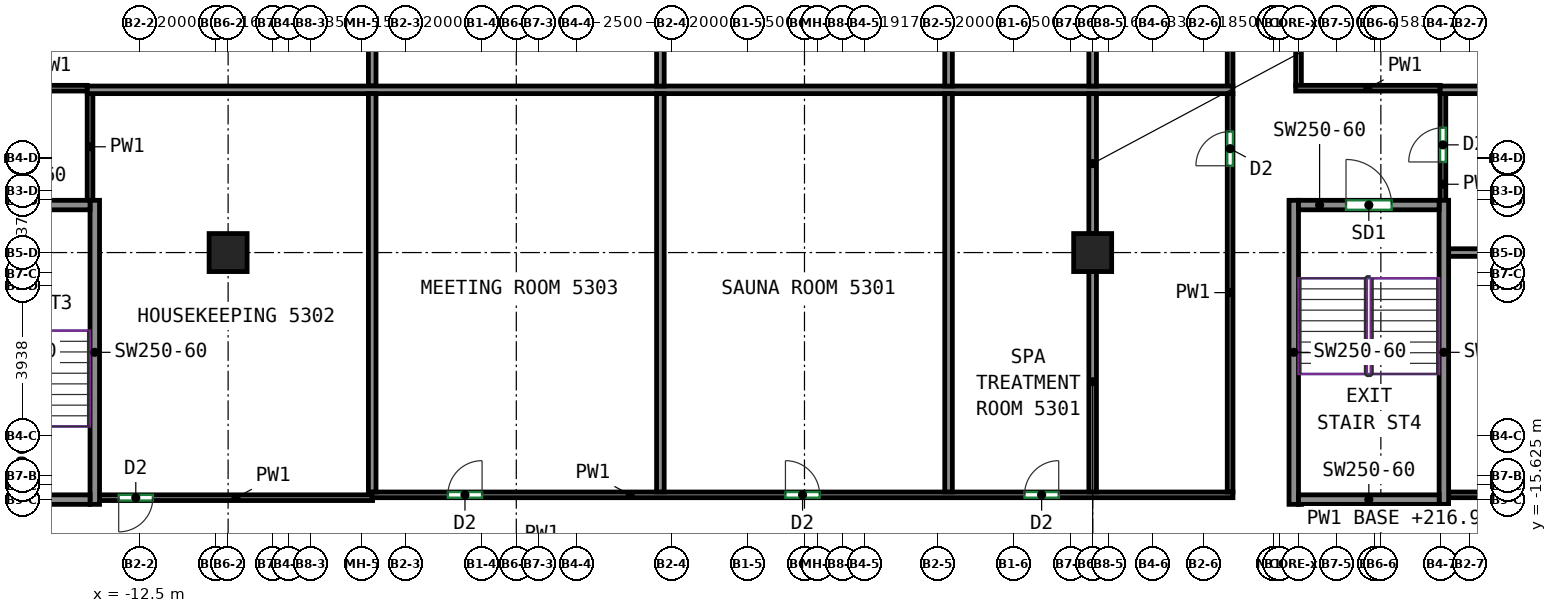
"""IFC4 building model, lengths in metres.
Left out: names, types, materials, properties, quantities, classifications, styles, units other than length and angle.
Written with IfcOpenShell. Run it as: python <this file> out.ifc"""

import sys

from ifc_helpers import new_model, si_unit, direction, frame, frame_2d, origin, origin_2d, place, context, subcontext, project, spatial, rectangle, extrude, source, transform, mapped, element, fill, save


model = new_model("IFC4")
c1 = context("Model", 3, precision=1e-05, world=origin(), true_north=direction((0.0, 1.0)))
c2 = subcontext(c1, "Body", "Model", "MODEL_VIEW")
j1 = project(units=[si_unit("LENGTHUNIT", "METRE"), si_unit("PLANEANGLEUNIT", "RADIAN")], contexts=[c1])
p1 = place(None, origin())
s1 = spatial("IfcSite", under=j1, at=p1, CompositionType="ELEMENT")
p2 = place(p1, origin())
s2 = spatial("IfcBuilding", under=s1, at=p2, CompositionType="ELEMENT")
p3 = place(p2, frame((0.0, 0.0, 216.9)))
s3 = spatial("IfcBuildingStorey", under=s2, at=p3, CompositionType="ELEMENT", Elevation=216.9)
m1 = source(origin(), c2, "Body", "SweptSolid", [
    extrude(rectangle(XDim=1.0, YDim=1.0, at=origin_2d()), origin(), (0.0, 0.0, 1.0), 3.12),
])
for number, where, z_axis, x_axis in (
    (1, (-10.167, -9.125, 0.0), (0.0, 0.0, 1.0), (1.0, 0.0, 0.0)),
    (2, (12.583, -9.125, 0.0), (0.0, 0.0, 1.0), (1.0, 0.0, 0.0)),
):
    element("IfcColumn", number, at=place(p3, frame(where, z_axis=z_axis, x_axis=x_axis)), inside=s3, PredefinedType="COLUMN", context=c2, shape_type="MappedRepresentation", body=[
        mapped(m1, transform((0.0, 0.0, 0.0))),
    ])
m2 = source(origin(), c2, "Body", "SweptSolid", [
    extrude(rectangle(XDim=8.0, YDim=0.25, at=frame_2d((4.0, 0.0))), origin(), (0.0, 0.0, 1.0), 3.12),
])
p4 = place(p3, frame((-13.675, -15.75, 0.0), z_axis=(0.0, 0.0, 1.0), x_axis=(0.0, 1.0, 0.0)))
e3 = element("IfcWall", 3, at=p4, inside=s3, PredefinedType="SHEAR", context=c2, shape_type="MappedRepresentation", body=[
    mapped(m2, transform((0.0, 0.0, 0.0))),
])
m3 = source(origin(), c2, "Body", "SweptSolid", [
    extrude(rectangle(XDim=3.7, YDim=0.25, at=frame_2d((1.85, 0.0))), origin(), (0.0, 0.0, 1.0), 3.12),
])
p5 = place(p3, frame((-17.5, -15.625, 0.0), z_axis=(0.0, 0.0, 1.0), x_axis=(1.0, 0.0, 0.0)))
e4 = element("IfcWall", 4, at=p5, inside=s3, PredefinedType="SHEAR", context=c2, shape_type="MappedRepresentation", body=[
    mapped(m3, transform((0.0, 0.0, 0.0))),
])
p6 = place(p5, frame((1.25, 0.0, 0.0)))
e5 = element("IfcOpeningElement", 5, at=p6, cuts=e4, PredefinedType="OPENING", context=c2, shape_type="SweptSolid", body=[
    extrude(rectangle(XDim=1.2, YDim=2.1, at=frame_2d((0.6, 1.05))), frame((0.0, 0.135, 0.0), z_axis=(0.0, -1.0, 0.0), x_axis=(1.0, 0.0, 0.0)), (0.0, 0.0, 1.0), 0.27),
])
p7 = place(p3, frame((-17.5, -7.875, 0.0), z_axis=(0.0, 0.0, 1.0), x_axis=(1.0, 0.0, 0.0)))
e6 = element("IfcWall", 6, at=p7, inside=s3, PredefinedType="SHEAR", context=c2, shape_type="MappedRepresentation", body=[
    mapped(m3, transform((0.0, 0.0, 0.0))),
])
for number, where, z_axis, x_axis in (
    (7, (17.875, -15.75, 0.0), (0.0, 0.0, 1.0), (0.0, 1.0, 0.0)),
    (8, (21.825, -15.75, 0.0), (0.0, 0.0, 1.0), (0.0, 1.0, 0.0)),
):
    element("IfcWall", number, at=place(p3, frame(where, z_axis=z_axis, x_axis=x_axis)), inside=s3, PredefinedType="SHEAR", context=c2, shape_type="MappedRepresentation", body=[
        mapped(m2, transform((0.0, 0.0, 0.0))),
    ])
p8 = place(p3, frame((18.0, -15.625, 0.0), z_axis=(0.0, 0.0, 1.0), x_axis=(1.0, 0.0, 0.0)))
e9 = element("IfcWall", 9, at=p8, inside=s3, PredefinedType="SHEAR", context=c2, shape_type="MappedRepresentation", body=[
    mapped(m3, transform((0.0, 0.0, 0.0))),
])
p9 = place(p3, frame((18.0, -7.875, 0.0), z_axis=(0.0, 0.0, 1.0), x_axis=(1.0, 0.0, 0.0)))
e10 = element("IfcWall", 10, at=p9, inside=s3, PredefinedType="SHEAR", context=c2, shape_type="MappedRepresentation", body=[
    mapped(m3, transform((0.0, 0.0, 0.0))),
])
p10 = place(p9, frame((1.25, 0.0, 0.0)))
e11 = element("IfcOpeningElement", 11, at=p10, cuts=e10, PredefinedType="OPENING", context=c2, shape_type="SweptSolid", body=[
    extrude(rectangle(XDim=1.2, YDim=2.1, at=frame_2d((0.6, 1.05))), frame((0.0, 0.135, 0.0), z_axis=(0.0, -1.0, 0.0), x_axis=(1.0, 0.0, 0.0)), (0.0, 0.0, 1.0), 0.27),
])
p11 = place(p3, frame((18.0, -4.725, 0.0), z_axis=(0.0, 0.0, 1.0), x_axis=(0.0, 1.0, 0.0)))
e12 = element("IfcWall", 12, at=p11, inside=s3, PredefinedType="PARTITIONING", context=c2, shape_type="SweptSolid", body=[
    extrude(rectangle(XDim=8.35, YDim=0.15, at=frame_2d((4.175, 0.0))), origin(), (0.0, 0.0, 1.0), 3.12),
])
p12 = place(p11, frame((2.919, 0.0, 0.0)))
e13 = element("IfcOpeningElement", 13, at=p12, cuts=e12, PredefinedType="OPENING", context=c2, shape_type="SweptSolid", body=[
    extrude(rectangle(XDim=0.9, YDim=2.1, at=frame_2d((0.45, 1.05))), frame((0.0, 0.085, 0.0), z_axis=(0.0, -1.0, 0.0), x_axis=(1.0, 0.0, 0.0)), (0.0, 0.0, 1.0), 0.17),
])
p13 = place(p3, frame((17.925, -4.8, 0.0), z_axis=(0.0, 0.0, 1.0), x_axis=(1.0, 0.0, 0.0)))
e14 = element("IfcWall", 14, at=p13, inside=s3, PredefinedType="PARTITIONING", context=c2, shape_type="SweptSolid", body=[
    extrude(rectangle(XDim=3.802, YDim=0.15, at=frame_2d((1.901, 0.0))), origin(), (0.0, 0.0, 1.0), 3.12),
])
p14 = place(p3, frame((21.8, -7.75, 0.0), z_axis=(0.0, 0.0, 1.0), x_axis=(0.0, 1.0, 0.0)))
e15 = element("IfcWall", 15, at=p14, inside=s3, PredefinedType="PARTITIONING", context=c2, shape_type="SweptSolid", body=[
    extrude(rectangle(XDim=2.817, YDim=0.15, at=frame_2d((1.408, 0.0))), origin(), (0.0, 0.0, 1.0), 3.12),
])
p15 = place(p14, frame((1.009, 0.0, 0.0)))
e16 = element("IfcOpeningElement", 16, at=p15, cuts=e15, PredefinedType="OPENING", context=c2, shape_type="SweptSolid", body=[
    extrude(rectangle(XDim=0.9, YDim=2.1, at=frame_2d((0.45, 1.05))), frame((0.0, 0.085, 0.0), z_axis=(0.0, -1.0, 0.0), x_axis=(1.0, 0.0, 0.0)), (0.0, 0.0, 1.0), 0.17),
])
p16 = place(p3, frame((21.95, -15.5, 0.0), z_axis=(0.0, 0.0, 1.0), x_axis=(1.0, 0.0, 0.0)))
e17 = element("IfcWall", 17, at=p16, inside=s3, PredefinedType="PARTITIONING", context=c2, shape_type="SweptSolid", body=[
    extrude(rectangle(XDim=5.875, YDim=0.15, at=frame_2d((2.938, 0.0))), origin(), (0.0, 0.0, 1.0), 3.12),
])
p17 = place(p16, frame((3.658, 0.0, 0.0)))
e18 = element("IfcOpeningElement", 18, at=p17, cuts=e17, PredefinedType="OPENING", context=c2, shape_type="SweptSolid", body=[
    extrude(rectangle(XDim=1.0, YDim=2.1, at=frame_2d((0.5, 1.05))), frame((0.0, 0.085, 0.0), z_axis=(0.0, -1.0, 0.0), x_axis=(1.0, 0.0, 0.0)), (0.0, 0.0, 1.0), 0.17),
])
p18 = place(p3, frame((-17.575, -4.8, 0.0), z_axis=(0.0, 0.0, 1.0), x_axis=(1.0, 0.0, 0.0)))
e19 = element("IfcWall", 19, at=p18, inside=s3, PredefinedType="PARTITIONING", context=c2, shape_type="SweptSolid", body=[
    extrude(rectangle(XDim=3.702, YDim=0.15, at=frame_2d((1.851, 0.0))), origin(), (0.0, 0.0, 1.0), 3.12),
])
p19 = place(p3, frame((16.2, -4.753, 0.0), z_axis=(0.0, 0.0, 1.0), x_axis=(0.0, 1.0, 0.0)))
e20 = element("IfcWall", 20, at=p19, inside=s3, PredefinedType="PARTITIONING", context=c2, shape_type="SweptSolid", body=[
    extrude(rectangle(XDim=8.378, YDim=0.15, at=frame_2d((4.189, 0.0))), origin(), (0.0, 0.0, 1.0), 3.12),
])
p20 = place(p19, frame((1.514, 0.0, 0.0)))
e21 = element("IfcOpeningElement", 21, at=p20, cuts=e20, PredefinedType="OPENING", context=c2, shape_type="SweptSolid", body=[
    extrude(rectangle(XDim=0.9, YDim=2.1, at=frame_2d((0.45, 1.05))), frame((0.0, 0.085, 0.0), z_axis=(0.0, -1.0, 0.0), x_axis=(1.0, 0.0, 0.0)), (0.0, 0.0, 1.0), 0.17),
])
p21 = place(p3, frame((-13.8, -7.75, 0.0), z_axis=(0.0, 0.0, 1.0), x_axis=(0.0, 1.0, 0.0)))
e22 = element("IfcWall", 22, at=p21, inside=s3, PredefinedType="PARTITIONING", context=c2, shape_type="SweptSolid", body=[
    extrude(rectangle(XDim=2.817, YDim=0.15, at=frame_2d((1.408, 0.0))), origin(), (0.0, 0.0, 1.0), 3.12),
])
p22 = place(p3, frame((-6.365, -15.575, 0.0), z_axis=(0.0, 0.0, 1.0), x_axis=(-1.0, 0.0, 0.0)))
e23 = element("IfcWall", 23, at=p22, inside=s3, PredefinedType="PARTITIONING", context=c2, shape_type="SweptSolid", body=[
    extrude(rectangle(XDim=7.185, YDim=0.15, at=frame_2d((3.593, 0.0))), origin(), (0.0, 0.0, 1.0), 3.12),
])
p23 = place(p22, frame((5.781, 0.0, 0.0)))
e24 = element("IfcOpeningElement", 24, at=p23, cuts=e23, PredefinedType="OPENING", context=c2, shape_type="SweptSolid", body=[
    extrude(rectangle(XDim=0.9, YDim=2.1, at=frame_2d((0.45, 1.05))), frame((0.0, 0.085, 0.0), z_axis=(0.0, -1.0, 0.0), x_axis=(1.0, 0.0, 0.0)), (0.0, 0.0, 1.0), 0.17),
])
p24 = place(p3, frame((-6.385, -15.5, 0.0), z_axis=(0.0, 0.0, 1.0), x_axis=(1.0, 0.0, 0.0)))
e25 = element("IfcWall", 25, at=p24, inside=s3, PredefinedType="PARTITIONING", context=c2, shape_type="SweptSolid", body=[
    extrude(rectangle(XDim=22.66, YDim=0.15, at=frame_2d((11.33, 0.0))), origin(), (0.0, 0.0, 1.0), 3.12),
])
p25 = place(p24, frame((2.001, 0.0, 0.0)))
e26 = element("IfcOpeningElement", 26, at=p25, cuts=e25, PredefinedType="OPENING", context=c2, shape_type="SweptSolid", body=[
    extrude(rectangle(XDim=0.9, YDim=2.1, at=frame_2d((0.45, 1.05))), frame((0.0, 0.085, 0.0), z_axis=(0.0, -1.0, 0.0), x_axis=(1.0, 0.0, 0.0)), (0.0, 0.0, 1.0), 0.17),
])
p26 = place(p24, frame((10.884, 0.0, 0.0)))
e27 = element("IfcOpeningElement", 27, at=p26, cuts=e25, PredefinedType="OPENING", context=c2, shape_type="SweptSolid", body=[
    extrude(rectangle(XDim=0.9, YDim=2.1, at=frame_2d((0.45, 1.05))), frame((0.0, 0.085, 0.0), z_axis=(0.0, -1.0, 0.0), x_axis=(1.0, 0.0, 0.0)), (0.0, 0.0, 1.0), 0.17),
])
p27 = place(p24, frame((17.175, 0.0, 0.0)))
e28 = element("IfcOpeningElement", 28, at=p27, cuts=e25, PredefinedType="OPENING", context=c2, shape_type="SweptSolid", body=[
    extrude(rectangle(XDim=0.9, YDim=2.1, at=frame_2d((0.45, 1.05))), frame((0.0, 0.085, 0.0), z_axis=(0.0, -1.0, 0.0), x_axis=(1.0, 0.0, 0.0)), (0.0, 0.0, 1.0), 0.17),
])
p28 = place(p3, frame((16.2, -15.425, 0.0), z_axis=(0.0, 0.0, 1.0), x_axis=(0.0, 1.0, 0.0)))
e29 = element("IfcWall", 29, at=p28, inside=s3, PredefinedType="PARTITIONING", context=c2, shape_type="SweptSolid", body=[
    extrude(rectangle(XDim=10.492, YDim=0.15, at=frame_2d((5.246, 0.0))), origin(), (0.0, 0.0, 1.0), 3.12),
])
p29 = place(p28, frame((8.584, 0.0, 0.0)))
e30 = element("IfcOpeningElement", 30, at=p29, cuts=e29, PredefinedType="OPENING", context=c2, shape_type="SweptSolid", body=[
    extrude(rectangle(XDim=0.9, YDim=2.1, at=frame_2d((0.45, 1.05))), frame((0.0, 0.085, 0.0), z_axis=(0.0, -1.0, 0.0), x_axis=(1.0, 0.0, 0.0)), (0.0, 0.0, 1.0), 0.17),
])
p30 = place(p3, frame((21.727, -4.843, 0.0), z_axis=(0.0, 0.0, 1.0), x_axis=(1.0, 0.0, 0.0)))
e31 = element("IfcWall", 31, at=p30, inside=s3, PredefinedType="PARTITIONING", context=c2, shape_type="SweptSolid", body=[
    extrude(rectangle(XDim=9.273, YDim=0.2, at=frame_2d((4.636, 0.0))), origin(), (0.0, 0.0, 1.0), 3.12),
])
p31 = place(p3, frame((21.95, -9.125, 0.0), z_axis=(0.0, 0.0, 1.0), x_axis=(1.0, 0.0, 0.0)))
e32 = element("IfcWall", 32, at=p31, inside=s3, PredefinedType="PARTITIONING", context=c2, shape_type="SweptSolid", body=[
    extrude(rectangle(XDim=8.475, YDim=0.2, at=frame_2d((4.238, 0.0))), origin(), (0.0, 0.0, 1.0), 3.12),
])
p32 = place(p3, frame((-6.375, -4.743, 0.0), z_axis=(0.0, 0.0, 1.0), x_axis=(0.0, 1.0, 0.0)))
e33 = element("IfcWall", 33, at=p32, inside=s3, PredefinedType="PARTITIONING", context=c2, shape_type="SweptSolid", body=[
    extrude(rectangle(XDim=8.366, YDim=0.2, at=frame_2d((4.183, 0.0))), origin(), (0.0, 0.0, 1.0), 3.12),
])
p33 = place(p3, frame((-13.873, -4.843, 0.0), z_axis=(0.0, 0.0, 1.0), x_axis=(1.0, 0.0, 0.0)))
e34 = element("IfcWall", 34, at=p33, inside=s3, PredefinedType="PARTITIONING", context=c2, shape_type="SweptSolid", body=[
    extrude(rectangle(XDim=30.146, YDim=0.2, at=frame_2d((15.073, 0.0))), origin(), (0.0, 0.0, 1.0), 3.12),
])
for number, where, z_axis, x_axis in (
    (35, (1.208, -4.743, 0.0), (0.0, 0.0, 1.0), (0.0, 1.0, 0.0)),
    (36, (8.791, -4.743, 0.0), (0.0, 0.0, 1.0), (0.0, 1.0, 0.0)),
):
    element("IfcWall", number, at=place(p3, frame(where, z_axis=z_axis, x_axis=x_axis)), inside=s3, PredefinedType="PARTITIONING", context=c2, shape_type="SweptSolid", body=[
        extrude(rectangle(XDim=8.366, YDim=0.2, at=frame_2d((4.183, 0.0))), origin(), (0.0, 0.0, 1.0), 3.12),
    ])
p34 = place(p3, frame((12.583, -4.743, 0.0), z_axis=(0.0, 0.0, 1.0), x_axis=(0.0, 1.0, 0.0)))
e37 = element("IfcWall", 37, at=p34, inside=s3, PredefinedType="PARTITIONING", context=c2, shape_type="SweptSolid", body=[
    extrude(rectangle(XDim=3.681, YDim=0.2, at=frame_2d((1.84, 0.0))), origin(), (0.0, 0.0, 1.0), 2.52),
])
for number, where, z_axis, x_axis in (
    (38, (-6.375, -15.423, 0.0), (0.0, 0.0, 1.0), (0.0, 1.0, 0.0)),
    (39, (1.208, -15.423, 0.0), (0.0, 0.0, 1.0), (0.0, 1.0, 0.0)),
    (40, (8.791, -15.423, 0.0), (0.0, 0.0, 1.0), (0.0, 1.0, 0.0)),
):
    element("IfcWall", number, at=place(p3, frame(where, z_axis=z_axis, x_axis=x_axis)), inside=s3, PredefinedType="PARTITIONING", context=c2, shape_type="SweptSolid", body=[
        extrude(rectangle(XDim=10.48, YDim=0.2, at=frame_2d((5.24, 0.0))), origin(), (0.0, 0.0, 1.0), 3.12),
    ])
p35 = place(p3, frame((12.583, -8.625, 0.0), z_axis=(0.0, 0.0, 1.0), x_axis=(0.0, 1.0, 0.0)))
e41 = element("IfcWall", 41, at=p35, inside=s3, PredefinedType="PARTITIONING", context=c2, shape_type="SweptSolid", body=[
    extrude(rectangle(XDim=3.682, YDim=0.2, at=frame_2d((1.841, 0.0))), origin(), (0.0, 0.0, 1.0), 2.52),
])
p36 = place(p3, frame((12.583, -15.423, 0.0), z_axis=(0.0, 0.0, 1.0), x_axis=(0.0, 1.0, 0.0)))
e42 = element("IfcWall", 42, at=p36, inside=s3, PredefinedType="PARTITIONING", context=c2, shape_type="SweptSolid", body=[
    extrude(rectangle(XDim=5.798, YDim=0.2, at=frame_2d((2.899, 0.0))), origin(), (0.0, 0.0, 1.0), 2.52),
])
p37 = place(p10, origin())
e43 = element("IfcDoor", 43, at=p37, inside=s3, OperationType="DOUBLE_DOOR_SINGLE_SWING", PredefinedType="DOOR", context=c2, shape_type="SweptSolid", body=[
    extrude(rectangle(XDim=1.2, YDim=2.1, at=frame_2d((0.6, 1.05))), frame((0.0, 0.025, 0.0), z_axis=(0.0, -1.0, 0.0), x_axis=(1.0, 0.0, 0.0)), (0.0, 0.0, 1.0), 0.05),
])
fill(e11, e43)
p38 = place(p23, origin())
e44 = element("IfcDoor", 44, at=p38, inside=s3, OperationType="SINGLE_SWING_RIGHT", PredefinedType="DOOR", context=c2, shape_type="SweptSolid", body=[
    extrude(rectangle(XDim=0.9, YDim=2.1, at=frame_2d((0.45, 1.05))), frame((0.0, 0.025, 0.0), z_axis=(0.0, -1.0, 0.0), x_axis=(1.0, 0.0, 0.0)), (0.0, 0.0, 1.0), 0.05),
])
fill(e24, e44)
p39 = place(p25, origin())
e45 = element("IfcDoor", 45, at=p39, inside=s3, OperationType="SINGLE_SWING_RIGHT", PredefinedType="DOOR", context=c2, shape_type="SweptSolid", body=[
    extrude(rectangle(XDim=0.9, YDim=2.1, at=frame_2d((0.45, 1.05))), frame((0.0, 0.025, 0.0), z_axis=(0.0, -1.0, 0.0), x_axis=(1.0, 0.0, 0.0)), (0.0, 0.0, 1.0), 0.05),
])
fill(e26, e45)
p40 = place(p26, origin())
e46 = element("IfcDoor", 46, at=p40, inside=s3, OperationType="SINGLE_SWING_LEFT", PredefinedType="DOOR", context=c2, shape_type="SweptSolid", body=[
    extrude(rectangle(XDim=0.9, YDim=2.1, at=frame_2d((0.45, 1.05))), frame((0.0, 0.025, 0.0), z_axis=(0.0, -1.0, 0.0), x_axis=(1.0, 0.0, 0.0)), (0.0, 0.0, 1.0), 0.05),
])
fill(e27, e46)
p41 = place(p27, origin())
e47 = element("IfcDoor", 47, at=p41, inside=s3, OperationType="SINGLE_SWING_RIGHT", PredefinedType="DOOR", context=c2, shape_type="SweptSolid", body=[
    extrude(rectangle(XDim=0.9, YDim=2.1, at=frame_2d((0.45, 1.05))), frame((0.0, 0.025, 0.0), z_axis=(0.0, -1.0, 0.0), x_axis=(1.0, 0.0, 0.0)), (0.0, 0.0, 1.0), 0.05),
])
fill(e28, e47)
p42 = place(p29, origin())
e48 = element("IfcDoor", 48, at=p42, inside=s3, OperationType="SINGLE_SWING_LEFT", PredefinedType="DOOR", context=c2, shape_type="SweptSolid", body=[
    extrude(rectangle(XDim=0.9, YDim=2.1, at=frame_2d((0.45, 1.05))), frame((0.0, 0.025, 0.0), z_axis=(0.0, -1.0, 0.0), x_axis=(1.0, 0.0, 0.0)), (0.0, 0.0, 1.0), 0.05),
])
fill(e30, e48)
p43 = place(p15, origin())
e49 = element("IfcDoor", 49, at=p43, inside=s3, OperationType="SINGLE_SWING_LEFT", PredefinedType="DOOR", context=c2, shape_type="SweptSolid", body=[
    extrude(rectangle(XDim=0.9, YDim=2.1, at=frame_2d((0.45, 1.05))), frame((0.0, 0.025, 0.0), z_axis=(0.0, -1.0, 0.0), x_axis=(1.0, 0.0, 0.0)), (0.0, 0.0, 1.0), 0.05),
])
fill(e16, e49)
save(model, sys.argv[1])
